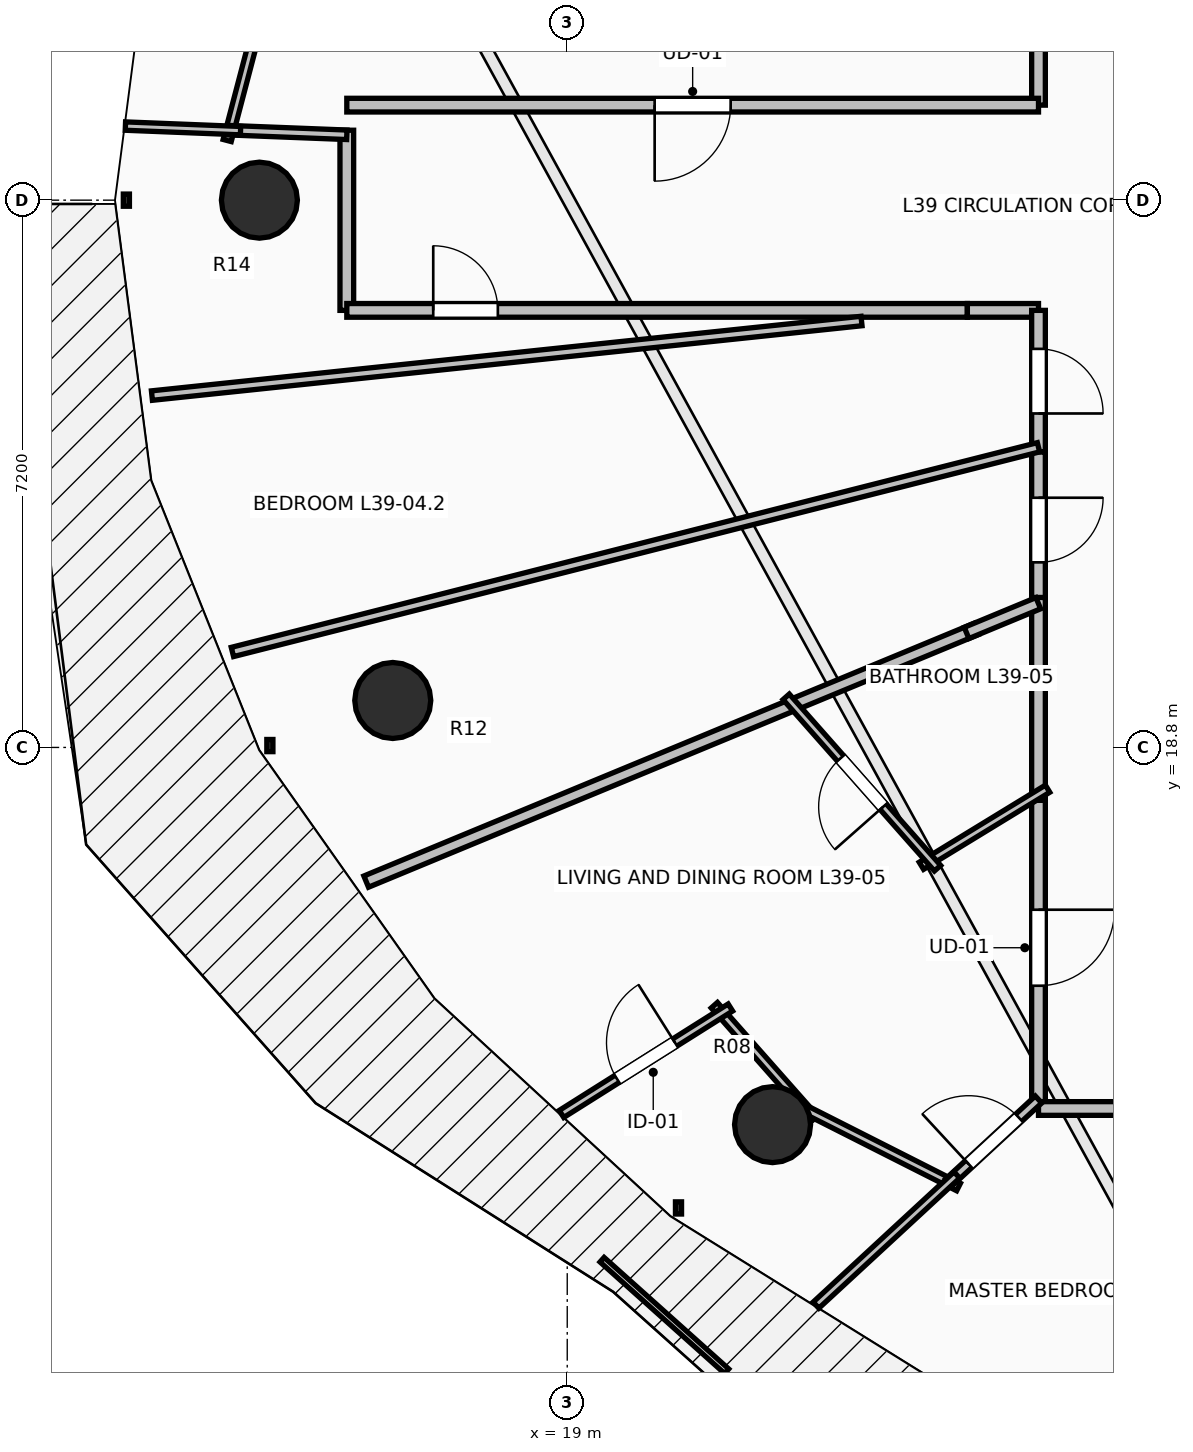
"""IFC4 building model, lengths in metres.
Left out: names, types, materials, properties, quantities, classifications, styles, units other than length and angle.
Written with IfcOpenShell. Run it as: python <this file> out.ifc"""

import sys

from ifc_helpers import new_model, si_unit, direction, frame, frame_2d, origin, origin_2d, place, context, subcontext, project, spatial, rectangle, circle, extrude, element, fill, save


model = new_model("IFC4")
c1 = context("Model", 3, precision=1e-05, world=origin(), true_north=direction((0.0, 1.0)))
c2 = subcontext(c1, "Body", "Model", "MODEL_VIEW")
j1 = project(units=[si_unit("LENGTHUNIT", "METRE"), si_unit("PLANEANGLEUNIT", "RADIAN")], contexts=[c1])
p1 = place(None, origin())
s1 = spatial("IfcSite", under=j1, at=p1, CompositionType="ELEMENT")
p2 = place(p1, origin())
s2 = spatial("IfcBuilding", under=s1, at=p2, CompositionType="ELEMENT")
p3 = place(p2, frame((0.0, 0.0, 146.6)))
s3 = spatial("IfcBuildingStorey", under=s2, at=p3, CompositionType="ELEMENT", Elevation=146.6)
for number, where, z_axis, x_axis in (
    (1, (14.95, 26.0, 0.0), (0.0, 0.0, 1.0), (-1.0, 0.0, 0.0)),
    (2, (16.705, 19.418, 0.0), (0.0, 0.0, 1.0), (-0.924, -0.383, 0.0)),
    (3, (21.701, 13.838, 0.0), (0.0, 0.0, 1.0), (-0.707, -0.707, 0.0)),
):
    element("IfcColumn", number, at=place(p3, frame(where, z_axis=z_axis, x_axis=x_axis)), inside=s3, PredefinedType="COLUMN", context=c2, shape_type="SweptSolid", body=[
        extrude(circle(Radius=0.5, at=origin_2d()), origin(), (0.0, 0.0, 1.0), 3.5),
    ])
p4 = place(p3, frame((25.2, 29.156, 0.0), z_axis=(0.0, 0.0, 1.0), x_axis=(0.0, -1.0, 0.0)))
e4 = element("IfcWall", 4, at=p4, inside=s3, PredefinedType="PARTITIONING", context=c2, shape_type="SweptSolid", body=[
    extrude(rectangle(XDim=1.906, YDim=0.18, at=frame_2d((0.953, 0.0))), origin(), (0.0, 0.0, 1.0), 2.432),
])
p5 = place(p3, frame((25.2, 27.25, 0.0), z_axis=(0.0, 0.0, 1.0), x_axis=(-1.0, 0.0, 0.0)))
e5 = element("IfcWall", 5, at=p5, inside=s3, PredefinedType="PARTITIONING", context=c2, shape_type="SweptSolid", body=[
    extrude(rectangle(XDim=9.1, YDim=0.18, at=frame_2d((4.55, 0.0))), origin(), (0.0, 0.0, 1.0), 2.432),
])
p6 = place(p5, frame((4.05, 0.0, 0.0)))
e6 = element("IfcOpeningElement", 6, at=p6, cuts=e5, PredefinedType="OPENING", context=c2, shape_type="SweptSolid", body=[
    extrude(rectangle(XDim=1.0, YDim=2.15, at=frame_2d((0.5, 1.075))), frame((0.0, 0.105, 0.0), z_axis=(0.0, -1.0, 0.0), x_axis=(1.0, 0.0, 0.0)), (0.0, 0.0, 1.0), 0.21),
])
p7 = place(p3, frame((16.1, 26.92, 0.0), z_axis=(0.0, 0.0, 1.0), x_axis=(0.0, -1.0, 0.0)))
e7 = element("IfcWall", 7, at=p7, inside=s3, PredefinedType="PARTITIONING", context=c2, shape_type="SweptSolid", body=[
    extrude(rectangle(XDim=2.37, YDim=0.18, at=frame_2d((1.185, 0.0))), origin(), (0.0, 0.0, 1.0), 2.432),
])
p8 = place(p3, frame((16.1, 24.55, 0.0), z_axis=(0.0, 0.0, 1.0), x_axis=(1.0, 0.0, 0.0)))
e8 = element("IfcWall", 8, at=p8, inside=s3, PredefinedType="PARTITIONING", context=c2, shape_type="SweptSolid", body=[
    extrude(rectangle(XDim=8.164, YDim=0.18, at=frame_2d((4.082, 0.0))), origin(), (0.0, 0.0, 1.0), 2.922),
])
p9 = place(p8, frame((1.137, 0.0, 0.0)))
e9 = element("IfcOpeningElement", 9, at=p9, cuts=e8, PredefinedType="OPENING", context=c2, shape_type="SweptSolid", body=[
    extrude(rectangle(XDim=0.85, YDim=2.1, at=frame_2d((0.425, 1.05))), frame((0.0, 0.105, 0.0), z_axis=(0.0, -1.0, 0.0), x_axis=(1.0, 0.0, 0.0)), (0.0, 0.0, 1.0), 0.21),
])
p10 = place(p3, frame((24.264, 24.55, 0.0), z_axis=(0.0, 0.0, 1.0), x_axis=(1.0, 0.0, 0.0)))
e10 = element("IfcWall", 10, at=p10, inside=s3, PredefinedType="PARTITIONING", context=c2, shape_type="SweptSolid", body=[
    extrude(rectangle(XDim=0.936, YDim=0.18, at=frame_2d((0.468, 0.0))), origin(), (0.0, 0.0, 1.0), 3.24),
])
p11 = place(p3, frame((25.2, 24.55, 0.0), z_axis=(0.0, 0.0, 1.0), x_axis=(0.0, -1.0, 0.0)))
e11 = element("IfcWall", 11, at=p11, inside=s3, PredefinedType="PARTITIONING", context=c2, shape_type="SweptSolid", body=[
    extrude(rectangle(XDim=1.863, YDim=0.18, at=frame_2d((0.932, 0.0))), origin(), (0.0, 0.0, 1.0), 3.24),
])
p12 = place(p11, frame((0.507, 0.0, 0.0)))
e12 = element("IfcOpeningElement", 12, at=p12, cuts=e11, PredefinedType="OPENING", context=c2, shape_type="SweptSolid", body=[
    extrude(rectangle(XDim=0.85, YDim=2.1, at=frame_2d((0.425, 1.05))), frame((0.0, 0.105, 0.0), z_axis=(0.0, -1.0, 0.0), x_axis=(1.0, 0.0, 0.0)), (0.0, 0.0, 1.0), 0.21),
])
p13 = place(p3, frame((25.2, 22.687, 0.0), z_axis=(0.0, 0.0, 1.0), x_axis=(0.0, -1.0, 0.0)))
e13 = element("IfcWall", 13, at=p13, inside=s3, PredefinedType="PARTITIONING", context=c2, shape_type="SweptSolid", body=[
    extrude(rectangle(XDim=2.054, YDim=0.18, at=frame_2d((1.027, 0.0))), origin(), (0.0, 0.0, 1.0), 3.24),
])
p14 = place(p13, frame((0.602, 0.0, 0.0)))
e14 = element("IfcOpeningElement", 14, at=p14, cuts=e13, PredefinedType="OPENING", context=c2, shape_type="SweptSolid", body=[
    extrude(rectangle(XDim=0.85, YDim=2.1, at=frame_2d((0.425, 1.05))), frame((0.0, 0.105, 0.0), z_axis=(0.0, -1.0, 0.0), x_axis=(1.0, 0.0, 0.0)), (0.0, 0.0, 1.0), 0.21),
])
p15 = place(p3, frame((25.2, 18.244, 0.0), z_axis=(0.0, 0.0, 1.0), x_axis=(0.0, -1.0, 0.0)))
e15 = element("IfcWall", 15, at=p15, inside=s3, PredefinedType="PARTITIONING", context=c2, shape_type="SweptSolid", body=[
    extrude(rectangle(XDim=4.158, YDim=0.18, at=frame_2d((2.079, 0.0))), origin(), (0.0, 0.0, 1.0), 2.432),
])
p16 = place(p15, frame((1.579, 0.0, 0.0)))
e16 = element("IfcOpeningElement", 16, at=p16, cuts=e15, PredefinedType="OPENING", context=c2, shape_type="SweptSolid", body=[
    extrude(rectangle(XDim=1.0, YDim=2.15, at=frame_2d((0.5, 1.075))), frame((0.0, 0.105, 0.0), z_axis=(0.0, -1.0, 0.0), x_axis=(1.0, 0.0, 0.0)), (0.0, 0.0, 1.0), 0.21),
])
p17 = place(p3, frame((25.2, 20.773, 0.0), z_axis=(0.0, 0.0, 1.0), x_axis=(0.0, -1.0, 0.0)))
e17 = element("IfcWall", 17, at=p17, inside=s3, PredefinedType="PARTITIONING", context=c2, shape_type="SweptSolid", body=[
    extrude(rectangle(XDim=2.669, YDim=0.18, at=frame_2d((1.334, 0.0))), origin(), (0.0, 0.0, 1.0), 3.24),
])
p18 = place(p3, frame((25.2, 14.05, 0.0), z_axis=(0.0, 0.0, 1.0), x_axis=(1.0, 0.0, 0.0)))
e18 = element("IfcWall", 18, at=p18, inside=s3, PredefinedType="PARTITIONING", context=c2, shape_type="SweptSolid", body=[
    extrude(rectangle(XDim=4.531, YDim=0.18, at=frame_2d((2.266, 0.0))), origin(), (0.0, 0.0, 1.0), 2.432),
])
p19 = place(p3, frame((15.689, 31.204, 0.0), z_axis=(0.0, 0.0, 1.0), x_axis=(-0.254346037576, -0.967113278354, 0.0)))
e19 = element("IfcWall", 19, at=p19, inside=s3, PredefinedType="PARTITIONING", context=c2, shape_type="SweptSolid", body=[
    extrude(rectangle(XDim=4.57, YDim=0.11, at=frame_2d((2.285, 0.0))), origin(), (0.0, 0.0, 1.0), 3.24),
])
p20 = place(p19, frame((1.835, 0.0, 0.0)))
e20 = element("IfcOpeningElement", 20, at=p20, cuts=e19, PredefinedType="OPENING", context=c2, shape_type="SweptSolid", body=[
    extrude(rectangle(XDim=0.9, YDim=2.1, at=frame_2d((0.45, 1.05))), frame((0.0, 0.07, 0.0), z_axis=(0.0, -1.0, 0.0), x_axis=(1.0, 0.0, 0.0)), (0.0, 0.0, 1.0), 0.14),
])
p21 = place(p3, frame((14.562, 26.92, 0.0), z_axis=(0.0, 0.0, 1.0), x_axis=(0.999244683777, -0.03885951548, 0.0)))
e21 = element("IfcWall", 21, at=p21, inside=s3, PredefinedType="PARTITIONING", context=c2, shape_type="SweptSolid", body=[
    extrude(rectangle(XDim=1.539, YDim=0.125, at=frame_2d((0.77, 0.0))), origin(), (0.0, 0.0, 1.0), 2.728),
])
p22 = place(p3, frame((13.187, 26.975, 0.0), z_axis=(0.0, 0.0, 1.0), x_axis=(0.999208657324, -0.039775106907, 0.0)))
e22 = element("IfcWall", 22, at=p22, inside=s3, PredefinedType="PARTITIONING", context=c2, shape_type="SweptSolid", body=[
    extrude(rectangle(XDim=1.516, YDim=0.11, at=frame_2d((0.758, 0.0))), origin(), (0.0, 0.0, 1.0), 3.24),
])
p23 = place(p3, frame((13.536, 23.429, 0.0), z_axis=(0.0, 0.0, 1.0), x_axis=(0.994524817277, 0.104500659427, 0.0)))
e23 = element("IfcWall", 23, at=p23, inside=s3, PredefinedType="PARTITIONING", context=c2, shape_type="SweptSolid", body=[
    extrude(rectangle(XDim=9.387, YDim=0.125, at=frame_2d((4.694, 0.0))), origin(), (0.0, 0.0, 1.0), 2.728),
])
p24 = place(p3, frame((14.595, 20.056, 0.0), z_axis=(0.0, 0.0, 1.0), x_axis=(0.969235416515, 0.246135546747, 0.0)))
e24 = element("IfcWall", 24, at=p24, inside=s3, PredefinedType="PARTITIONING", context=c2, shape_type="SweptSolid", body=[
    extrude(rectangle(XDim=10.942, YDim=0.125, at=frame_2d((5.471, 0.0))), origin(), (0.0, 0.0, 1.0), 2.728),
])
p25 = place(p3, frame((16.355, 17.035, 0.0), z_axis=(0.0, 0.0, 1.0), x_axis=(0.923885339237, 0.382669413387, 0.0)))
e25 = element("IfcWall", 25, at=p25, inside=s3, PredefinedType="PARTITIONING", context=c2, shape_type="SweptSolid", body=[
    extrude(rectangle(XDim=8.689, YDim=0.16, at=frame_2d((4.345, 0.0))), origin(), (0.0, 0.0, 1.0), 2.432),
])
p26 = place(p3, frame((24.254, 20.306, 0.0), z_axis=(0.0, 0.0, 1.0), x_axis=(0.923789545328, 0.382900608439, 0.0)))
e26 = element("IfcWall", 26, at=p26, inside=s3, PredefinedType="PARTITIONING", context=c2, shape_type="SweptSolid", body=[
    extrude(rectangle(XDim=1.021, YDim=0.16, at=frame_2d((0.511, 0.0))), origin(), (0.0, 0.0, 1.0), 3.24),
])
p27 = place(p3, frame((25.32, 18.257, 0.0), z_axis=(0.0, 0.0, 1.0), x_axis=(-0.853368681548, -0.52130786811, 0.0)))
e27 = element("IfcWall", 27, at=p27, inside=s3, PredefinedType="PARTITIONING", context=c2, shape_type="SweptSolid", body=[
    extrude(rectangle(XDim=1.945, YDim=0.11, at=frame_2d((0.973, 0.0))), origin(), (0.0, 0.0, 1.0), 2.432),
])
p28 = place(p3, frame((23.872, 17.211, 0.0), z_axis=(0.0, 0.0, 1.0), x_axis=(-0.66196248337, 0.74953697081, 0.0)))
e28 = element("IfcWall", 28, at=p28, inside=s3, PredefinedType="PARTITIONING", context=c2, shape_type="SweptSolid", body=[
    extrude(rectangle(XDim=3.008, YDim=0.11, at=frame_2d((1.504, 0.0))), origin(), (0.0, 0.0, 1.0), 2.432),
])
p29 = place(p28, frame((1.079, 0.0, 0.0)))
e29 = element("IfcOpeningElement", 29, at=p29, cuts=e28, PredefinedType="OPENING", context=c2, shape_type="SweptSolid", body=[
    extrude(rectangle(XDim=0.85, YDim=2.1, at=frame_2d((0.425, 1.05))), frame((0.0, 0.07, 0.0), z_axis=(0.0, -1.0, 0.0), x_axis=(1.0, 0.0, 0.0)), (0.0, 0.0, 1.0), 0.14),
])
p30 = place(p3, frame((20.935, 15.409, 0.0), z_axis=(0.0, 0.0, 1.0), x_axis=(0.66216897397, -0.749354555542, 0.0)))
e30 = element("IfcWall", 30, at=p30, inside=s3, PredefinedType="PARTITIONING", context=c2, shape_type="SweptSolid", body=[
    extrude(rectangle(XDim=1.991, YDim=0.11, at=frame_2d((0.996, 0.0))), origin(), (0.0, 0.0, 1.0), 2.432),
])
p31 = place(p3, frame((22.036, 14.085, 0.0), z_axis=(0.0, 0.0, 1.0), x_axis=(0.892312874209, -0.451417472548, 0.0)))
e31 = element("IfcWall", 31, at=p31, inside=s3, PredefinedType="PARTITIONING", context=c2, shape_type="SweptSolid", body=[
    extrude(rectangle(XDim=2.367, YDim=0.11, at=frame_2d((1.183, 0.0))), origin(), (0.0, 0.0, 1.0), 2.432),
])
p32 = place(p3, frame((18.925, 13.979, 0.0), z_axis=(0.0, 0.0, 1.0), x_axis=(0.846034075758, 0.533128823697, 0.0)))
e32 = element("IfcWall", 32, at=p32, inside=s3, PredefinedType="PARTITIONING", context=c2, shape_type="SweptSolid", body=[
    extrude(rectangle(XDim=2.626, YDim=0.11, at=frame_2d((1.313, 0.0))), origin(), (0.0, 0.0, 1.0), 2.728),
])
p33 = place(p32, frame((0.863, 0.0, 0.0)))
e33 = element("IfcOpeningElement", 33, at=p33, cuts=e32, PredefinedType="OPENING", context=c2, shape_type="SweptSolid", body=[
    extrude(rectangle(XDim=0.9, YDim=2.1, at=frame_2d((0.45, 1.05))), frame((0.0, 0.07, 0.0), z_axis=(0.0, -1.0, 0.0), x_axis=(1.0, 0.0, 0.0)), (0.0, 0.0, 1.0), 0.14),
])
p34 = place(p3, frame((24.023, 13.08, 0.0), z_axis=(0.0, 0.0, 1.0), x_axis=(0.734359451791, 0.678760779336, 0.0)))
e34 = element("IfcWall", 34, at=p34, inside=s3, PredefinedType="PARTITIONING", context=c2, shape_type="SweptSolid", body=[
    extrude(rectangle(XDim=1.603, YDim=0.125, at=frame_2d((0.801, 0.0))), origin(), (0.0, 0.0, 1.0), 2.922),
])
p35 = place(p34, frame((0.351, 0.0, 0.0)))
e35 = element("IfcOpeningElement", 35, at=p35, cuts=e34, PredefinedType="OPENING", context=c2, shape_type="SweptSolid", body=[
    extrude(rectangle(XDim=0.9, YDim=2.1, at=frame_2d((0.45, 1.05))), frame((0.0, 0.077, 0.0), z_axis=(0.0, -1.0, 0.0), x_axis=(1.0, 0.0, 0.0)), (0.0, 0.0, 1.0), 0.155),
])
p36 = place(p3, frame((22.273, 11.463, 0.0), z_axis=(0.0, 0.0, 1.0), x_axis=(0.73438401738, 0.678734200565, 0.0)))
e36 = element("IfcWall", 36, at=p36, inside=s3, PredefinedType="PARTITIONING", context=c2, shape_type="SweptSolid", body=[
    extrude(rectangle(XDim=2.522, YDim=0.11, at=frame_2d((1.261, 0.0))), origin(), (0.0, 0.0, 1.0), 2.728),
])
p37 = place(p6, origin())
e37 = element("IfcDoor", 37, at=p37, inside=s3, OperationType="SINGLE_SWING_RIGHT", PredefinedType="DOOR", context=c2, shape_type="SweptSolid", body=[
    extrude(rectangle(XDim=1.0, YDim=2.15, at=frame_2d((0.5, 1.075))), frame((0.0, 0.025, 0.0), z_axis=(0.0, -1.0, 0.0), x_axis=(1.0, 0.0, 0.0)), (0.0, 0.0, 1.0), 0.05),
])
fill(e6, e37)
p38 = place(p16, origin())
e38 = element("IfcDoor", 38, at=p38, inside=s3, OperationType="SINGLE_SWING_LEFT", PredefinedType="DOOR", context=c2, shape_type="SweptSolid", body=[
    extrude(rectangle(XDim=1.0, YDim=2.15, at=frame_2d((0.5, 1.075))), frame((0.0, 0.025, 0.0), z_axis=(0.0, -1.0, 0.0), x_axis=(1.0, 0.0, 0.0)), (0.0, 0.0, 1.0), 0.05),
])
fill(e16, e38)
p39 = place(p29, origin())
e39 = element("IfcDoor", 39, at=p39, inside=s3, OperationType="SINGLE_SWING_LEFT", PredefinedType="DOOR", context=c2, shape_type="SweptSolid", body=[
    extrude(rectangle(XDim=0.85, YDim=2.1, at=frame_2d((0.425, 1.05))), frame((0.0, 0.025, 0.0), z_axis=(0.0, -1.0, 0.0), x_axis=(1.0, 0.0, 0.0)), (0.0, 0.0, 1.0), 0.05),
])
fill(e29, e39)
p40 = place(p33, origin())
e40 = element("IfcDoor", 40, at=p40, inside=s3, OperationType="SINGLE_SWING_RIGHT", PredefinedType="DOOR", context=c2, shape_type="SweptSolid", body=[
    extrude(rectangle(XDim=0.9, YDim=2.1, at=frame_2d((0.45, 1.05))), frame((0.0, 0.025, 0.0), z_axis=(0.0, -1.0, 0.0), x_axis=(1.0, 0.0, 0.0)), (0.0, 0.0, 1.0), 0.05),
])
fill(e33, e40)
p41 = place(p35, origin())
e41 = element("IfcDoor", 41, at=p41, inside=s3, OperationType="SINGLE_SWING_LEFT", PredefinedType="DOOR", context=c2, shape_type="SweptSolid", body=[
    extrude(rectangle(XDim=0.9, YDim=2.1, at=frame_2d((0.45, 1.05))), frame((0.0, 0.025, 0.0), z_axis=(0.0, -1.0, 0.0), x_axis=(1.0, 0.0, 0.0)), (0.0, 0.0, 1.0), 0.05),
])
fill(e35, e41)
p42 = place(p9, origin())
e42 = element("IfcDoor", 42, at=p42, inside=s3, OperationType="SINGLE_SWING_LEFT", PredefinedType="DOOR", context=c2, shape_type="SweptSolid", body=[
    extrude(rectangle(XDim=0.85, YDim=2.1, at=frame_2d((0.425, 1.05))), frame((0.0, 0.025, 0.0), z_axis=(0.0, -1.0, 0.0), x_axis=(1.0, 0.0, 0.0)), (0.0, 0.0, 1.0), 0.05),
])
fill(e9, e42)
p43 = place(p12, origin())
e43 = element("IfcDoor", 43, at=p43, inside=s3, OperationType="SINGLE_SWING_RIGHT", PredefinedType="DOOR", context=c2, shape_type="SweptSolid", body=[
    extrude(rectangle(XDim=0.85, YDim=2.1, at=frame_2d((0.425, 1.05))), frame((0.0, 0.025, 0.0), z_axis=(0.0, -1.0, 0.0), x_axis=(1.0, 0.0, 0.0)), (0.0, 0.0, 1.0), 0.05),
])
fill(e12, e43)
p44 = place(p14, origin())
e44 = element("IfcDoor", 44, at=p44, inside=s3, OperationType="SINGLE_SWING_LEFT", PredefinedType="DOOR", context=c2, shape_type="SweptSolid", body=[
    extrude(rectangle(XDim=0.85, YDim=2.1, at=frame_2d((0.425, 1.05))), frame((0.0, 0.025, 0.0), z_axis=(0.0, -1.0, 0.0), x_axis=(1.0, 0.0, 0.0)), (0.0, 0.0, 1.0), 0.05),
])
fill(e14, e44)
save(model, sys.argv[1])
